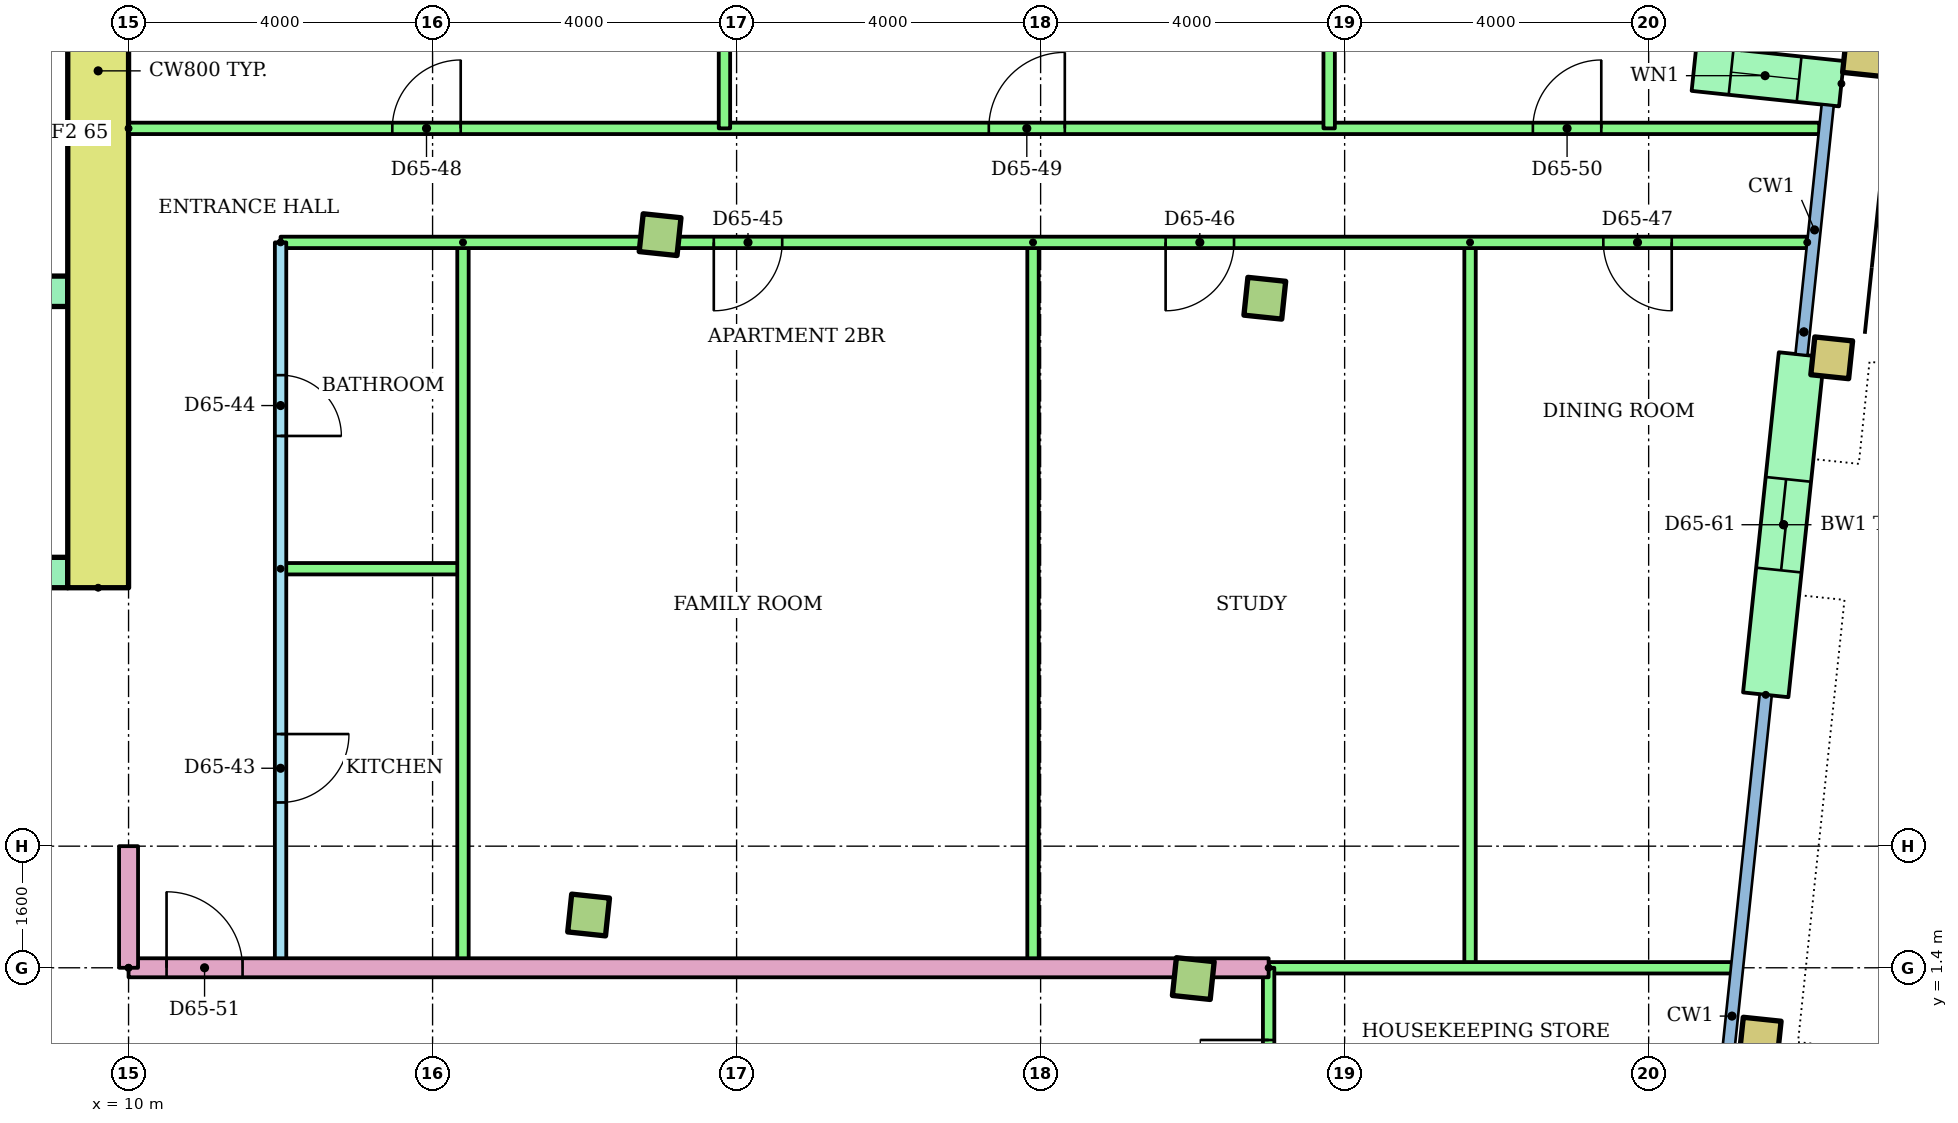
"""IFC4 building model, lengths in metres.
Left out: names, types, materials, properties, quantities, classifications, styles, units other than length and angle.
Written with IfcOpenShell. Run it as: python <this file> out.ifc"""

import sys

from ifc_helpers import new_model, si_unit, direction, frame, frame_2d, origin, origin_2d, place, context, subcontext, project, spatial, rectangle, hollow_rectangle, extrude, element, fill, save


model = new_model("IFC4")
c1 = context("Model", 3, precision=1e-05, world=origin(), true_north=direction((0.0, 1.0)))
c2 = subcontext(c1, "Body", "Model", "MODEL_VIEW")
j1 = project(units=[si_unit("LENGTHUNIT", "METRE"), si_unit("PLANEANGLEUNIT", "RADIAN")], contexts=[c1])
p1 = place(None, origin())
s1 = spatial("IfcSite", under=j1, at=p1, CompositionType="ELEMENT")
p2 = place(p1, origin())
s2 = spatial("IfcBuilding", under=s1, at=p2, CompositionType="ELEMENT")
p3 = place(p2, frame((0.0, 0.0, 253.1)))
s3 = spatial("IfcBuildingStorey", under=s2, at=p3, CompositionType="ELEMENT", Elevation=253.1)
for number, where, z_axis, x_axis in (
    (1, (16.053, 2.094, 0.0), (0.0, 0.0, 1.0), (0.995, -0.105, 0.0)),
    (2, (24.009, 1.258, 0.0), (0.0, 0.0, 1.0), (0.995, -0.105, 0.0)),
):
    element("IfcColumn", number, at=place(p3, frame(where, z_axis=z_axis, x_axis=x_axis)), inside=s3, PredefinedType="COLUMN", context=c2, shape_type="SweptSolid", body=[
        extrude(rectangle(XDim=0.5, YDim=0.5, at=origin_2d()), origin(), (0.0, 0.0, 1.0), 3.2),
    ])
p4 = place(p3, frame((31.468, 0.474, 0.0), z_axis=(0.0, 0.0, 1.0), x_axis=(0.994521895368, -0.104528463268, 0.0)))
e3 = element("IfcColumn", 3, at=p4, inside=s3, PredefinedType="COLUMN", context=c2, shape_type="SweptSolid", body=[
    extrude(hollow_rectangle(XDim=0.5, YDim=0.5, WallThickness=0.025, at=origin_2d()), origin(), (0.0, 0.0, 1.0), 3.2),
])
for number, where, z_axis, x_axis in (
    (4, (16.993, 11.045, 0.0), (0.0, 0.0, 1.0), (0.995, -0.105, 0.0)),
    (5, (24.95, 10.209, 0.0), (0.0, 0.0, 1.0), (0.995, -0.105, 0.0)),
):
    element("IfcColumn", number, at=place(p3, frame(where, z_axis=z_axis, x_axis=x_axis)), inside=s3, PredefinedType="COLUMN", context=c2, shape_type="SweptSolid", body=[
        extrude(rectangle(XDim=0.5, YDim=0.5, at=origin_2d()), origin(), (0.0, 0.0, 1.0), 3.2),
    ])
for number, where, z_axis, x_axis in (
    (6, (32.409, 9.425, 0.0), (0.0, 0.0, 1.0), (0.995, -0.105, 0.0)),
    (7, (32.827, 13.403, 0.0), (0.0, 0.0, 1.0), (0.995, -0.105, 0.0)),
):
    element("IfcColumn", number, at=place(p3, frame(where, z_axis=z_axis, x_axis=x_axis)), inside=s3, PredefinedType="COLUMN", context=c2, shape_type="SweptSolid", body=[
        extrude(hollow_rectangle(XDim=0.5, YDim=0.5, WallThickness=0.025, at=origin_2d()), origin(), (0.0, 0.0, 1.0), 3.2),
    ])
p5 = place(p3, frame((32.536, 13.031, 0.0), z_axis=(0.0, 0.0, 1.0), x_axis=(-0.994534226826, 0.104411070641, 0.0)))
e8 = element("IfcWall", 8, at=p5, inside=s3, PredefinedType="STANDARD", context=c2, shape_type="SweptSolid", body=[
    extrude(rectangle(XDim=1.95, YDim=0.6, at=frame_2d((0.975, 0.0))), origin(), (0.0, 0.0, 1.0), 2.92),
])
p6 = place(p5, frame((0.56, 0.0, 0.9)))
e9 = element("IfcOpeningElement", 9, at=p6, cuts=e8, PredefinedType="OPENING", context=c2, shape_type="SweptSolid", body=[
    extrude(rectangle(XDim=0.9, YDim=1.5, at=frame_2d((0.45, 0.75))), frame((0.0, 0.31, 0.0), z_axis=(0.0, -1.0, 0.0), x_axis=(1.0, 0.0, 0.0)), (0.0, 0.0, 1.0), 0.62),
])
p7 = place(p3, frame((31.54, 4.991, 0.0), z_axis=(0.0, 0.0, 1.0), x_axis=(0.104546400045, 0.994520009974, 0.0)))
e10 = element("IfcWall", 10, at=p7, inside=s3, PredefinedType="STANDARD", context=c2, shape_type="SweptSolid", body=[
    extrude(rectangle(XDim=4.5, YDim=0.6, at=frame_2d((2.25, 0.0))), origin(), (0.0, 0.0, 1.0), 2.92),
])
p8 = place(p7, frame((1.65, 0.0, 0.0)))
e11 = element("IfcOpeningElement", 11, at=p8, cuts=e10, PredefinedType="OPENING", context=c2, shape_type="SweptSolid", body=[
    extrude(rectangle(XDim=1.2, YDim=2.1, at=frame_2d((0.6, 1.05))), frame((0.0, 0.31, 0.0), z_axis=(0.0, -1.0, 0.0), x_axis=(1.0, 0.0, 0.0)), (0.0, 0.0, 1.0), 0.62),
])
p9 = place(p3, frame((9.6, 6.4, 0.0), z_axis=(0.0, 0.0, 1.0), x_axis=(0.0, 1.0, 0.0)))
e12 = element("IfcWall", 12, at=p9, inside=s3, PredefinedType="SHEAR", context=c2, shape_type="SweptSolid", body=[
    extrude(rectangle(XDim=13.6, YDim=0.8, at=frame_2d((6.8, 0.0))), origin(), (0.0, 0.0, 1.0), 2.92),
])
p10 = place(p3, frame((-9.2, 6.6, 0.0)))
e13 = element("IfcWall", 13, at=p10, inside=s3, PredefinedType="SHEAR", context=c2, shape_type="SweptSolid", body=[
    extrude(rectangle(XDim=18.4, YDim=0.4, at=frame_2d((9.2, 0.0))), origin(), (0.0, 0.0, 1.0), 2.92),
])
p11 = place(p10, frame((8.3, 0.0, 0.0)))
e14 = element("IfcOpeningElement", 14, at=p11, cuts=e13, PredefinedType="OPENING", context=c2, shape_type="SweptSolid", body=[
    extrude(rectangle(XDim=1.8, YDim=2.1, at=frame_2d((0.9, 1.05))), frame((0.0, 0.21, 0.0), z_axis=(0.0, -1.0, 0.0), x_axis=(1.0, 0.0, 0.0)), (0.0, 0.0, 1.0), 0.42),
])
p12 = place(p10, frame((3.8, 0.0, 0.0)))
e15 = element("IfcOpeningElement", 15, at=p12, cuts=e13, PredefinedType="OPENING", context=c2, shape_type="SweptSolid", body=[
    extrude(rectangle(XDim=1.8, YDim=2.1, at=frame_2d((0.9, 1.05))), frame((0.0, 0.21, 0.0), z_axis=(0.0, -1.0, 0.0), x_axis=(1.0, 0.0, 0.0)), (0.0, 0.0, 1.0), 0.42),
])
p13 = place(p10, frame((12.8, 0.0, 0.0)))
e16 = element("IfcOpeningElement", 16, at=p13, cuts=e13, PredefinedType="OPENING", context=c2, shape_type="SweptSolid", body=[
    extrude(rectangle(XDim=1.8, YDim=2.1, at=frame_2d((0.9, 1.05))), frame((0.0, 0.21, 0.0), z_axis=(0.0, -1.0, 0.0), x_axis=(1.0, 0.0, 0.0)), (0.0, 0.0, 1.0), 0.42),
])
p14 = place(p3, frame((1.2, 10.3, 0.0)))
e17 = element("IfcWall", 17, at=p14, inside=s3, PredefinedType="SHEAR", context=c2, shape_type="SweptSolid", body=[
    extrude(rectangle(XDim=8.0, YDim=0.4, at=frame_2d((4.0, 0.0))), origin(), (0.0, 0.0, 1.0), 2.92),
])
p15 = place(p14, frame((0.817, 0.0, 0.0)))
e18 = element("IfcOpeningElement", 18, at=p15, cuts=e17, PredefinedType="OPENING", context=c2, shape_type="SweptSolid", body=[
    extrude(rectangle(XDim=1.1, YDim=2.1, at=frame_2d((0.55, 1.05))), frame((0.0, 0.21, 0.0), z_axis=(0.0, -1.0, 0.0), x_axis=(1.0, 0.0, 0.0)), (0.0, 0.0, 1.0), 0.42),
])
p16 = place(p14, frame((3.55, 0.0, 0.0)))
e19 = element("IfcOpeningElement", 19, at=p16, cuts=e17, PredefinedType="OPENING", context=c2, shape_type="SweptSolid", body=[
    extrude(rectangle(XDim=1.1, YDim=2.1, at=frame_2d((0.55, 1.05))), frame((0.0, 0.21, 0.0), z_axis=(0.0, -1.0, 0.0), x_axis=(1.0, 0.0, 0.0)), (0.0, 0.0, 1.0), 0.42),
])
p17 = place(p14, frame((6.283, 0.0, 0.0)))
e20 = element("IfcOpeningElement", 20, at=p17, cuts=e17, PredefinedType="OPENING", context=c2, shape_type="SweptSolid", body=[
    extrude(rectangle(XDim=1.1, YDim=2.1, at=frame_2d((0.55, 1.05))), frame((0.0, 0.21, 0.0), z_axis=(0.0, -1.0, 0.0), x_axis=(1.0, 0.0, 0.0)), (0.0, 0.0, 1.0), 0.42),
])
p18 = place(p3, frame((12.0, 10.943, 0.0), z_axis=(0.0, 0.0, 1.0), x_axis=(0.0, -1.0, 0.0)))
e21 = element("IfcWall", 21, at=p18, inside=s3, PredefinedType="PARTITIONING", context=c2, shape_type="SweptSolid", body=[
    extrude(rectangle(XDim=9.543, YDim=0.15, at=frame_2d((4.772, 0.0))), origin(), (0.0, 0.0, 1.0), 2.4),
])
p19 = place(p18, frame((6.469, 0.0, 0.0)))
e22 = element("IfcOpeningElement", 22, at=p19, cuts=e21, PredefinedType="OPENING", context=c2, shape_type="SweptSolid", body=[
    extrude(rectangle(XDim=0.9, YDim=2.1, at=frame_2d((0.45, 1.05))), frame((0.0, 0.085, 0.0), z_axis=(0.0, -1.0, 0.0), x_axis=(1.0, 0.0, 0.0)), (0.0, 0.0, 1.0), 0.17),
])
p20 = place(p18, frame((1.747, 0.0, 0.0)))
e23 = element("IfcOpeningElement", 23, at=p20, cuts=e21, PredefinedType="OPENING", context=c2, shape_type="SweptSolid", body=[
    extrude(rectangle(XDim=0.8, YDim=2.1, at=frame_2d((0.4, 1.05))), frame((0.0, 0.085, 0.0), z_axis=(0.0, -1.0, 0.0), x_axis=(1.0, 0.0, 0.0)), (0.0, 0.0, 1.0), 0.17),
])
p21 = place(p3, frame((12.0, 6.65, 0.0)))
e24 = element("IfcWall", 24, at=p21, inside=s3, PredefinedType="PARTITIONING", context=c2, shape_type="SweptSolid", body=[
    extrude(rectangle(XDim=2.4, YDim=0.15, at=frame_2d((1.2, 0.0))), origin(), (0.0, 0.0, 1.0), 2.4),
])
for number, where, z_axis, x_axis in (
    (25, (14.4, 10.943, 0.0), (0.0, 0.0, 1.0), (0.0, -1.0, 0.0)),
    (26, (21.9, 10.943, 0.0), (0.0, 0.0, 1.0), (0.0, -1.0, 0.0)),
    (27, (27.65, 10.943, 0.0), (0.0, 0.0, 1.0), (0.0, -1.0, 0.0)),
):
    element("IfcWall", number, at=place(p3, frame(where, z_axis=z_axis, x_axis=x_axis)), inside=s3, PredefinedType="PARTITIONING", context=c2, shape_type="SweptSolid", body=[
        extrude(rectangle(XDim=9.543, YDim=0.15, at=frame_2d((4.772, 0.0))), origin(), (0.0, 0.0, 1.0), 2.4),
    ])
p22 = place(p3, frame((32.087, 10.943, 0.0), z_axis=(0.0, 0.0, 1.0), x_axis=(-1.0, 0.0, 0.0)))
e28 = element("IfcWall", 28, at=p22, inside=s3, PredefinedType="PARTITIONING", context=c2, shape_type="SweptSolid", body=[
    extrude(rectangle(XDim=20.087, YDim=0.15, at=frame_2d((10.043, 0.0))), origin(), (0.0, 0.0, 1.0), 2.4),
])
p23 = place(p22, frame((13.487, 0.0, 0.0)))
e29 = element("IfcOpeningElement", 29, at=p23, cuts=e28, PredefinedType="OPENING", context=c2, shape_type="SweptSolid", body=[
    extrude(rectangle(XDim=0.9, YDim=2.1, at=frame_2d((0.45, 1.05))), frame((0.0, 0.085, 0.0), z_axis=(0.0, -1.0, 0.0), x_axis=(1.0, 0.0, 0.0)), (0.0, 0.0, 1.0), 0.17),
])
p24 = place(p22, frame((7.542, 0.0, 0.0)))
e30 = element("IfcOpeningElement", 30, at=p24, cuts=e28, PredefinedType="OPENING", context=c2, shape_type="SweptSolid", body=[
    extrude(rectangle(XDim=0.9, YDim=2.1, at=frame_2d((0.45, 1.05))), frame((0.0, 0.085, 0.0), z_axis=(0.0, -1.0, 0.0), x_axis=(1.0, 0.0, 0.0)), (0.0, 0.0, 1.0), 0.17),
])
p25 = place(p22, frame((1.783, 0.0, 0.0)))
e31 = element("IfcOpeningElement", 31, at=p25, cuts=e28, PredefinedType="OPENING", context=c2, shape_type="SweptSolid", body=[
    extrude(rectangle(XDim=0.9, YDim=2.1, at=frame_2d((0.45, 1.05))), frame((0.0, 0.085, 0.0), z_axis=(0.0, -1.0, 0.0), x_axis=(1.0, 0.0, 0.0)), (0.0, 0.0, 1.0), 0.17),
])
p26 = place(p3, frame((10.0, 12.443, 0.0)))
e32 = element("IfcWall", 32, at=p26, inside=s3, PredefinedType="PARTITIONING", context=c2, shape_type="SweptSolid", body=[
    extrude(rectangle(XDim=22.244, YDim=0.15, at=frame_2d((11.122, 0.0))), origin(), (0.0, 0.0, 1.0), 2.4),
])
p27 = place(p26, frame((3.47, 0.0, 0.0)))
e33 = element("IfcOpeningElement", 33, at=p27, cuts=e32, PredefinedType="OPENING", context=c2, shape_type="SweptSolid", body=[
    extrude(rectangle(XDim=0.9, YDim=2.1, at=frame_2d((0.45, 1.05))), frame((0.0, 0.085, 0.0), z_axis=(0.0, -1.0, 0.0), x_axis=(1.0, 0.0, 0.0)), (0.0, 0.0, 1.0), 0.17),
])
p28 = place(p26, frame((11.318, 0.0, 0.0)))
e34 = element("IfcOpeningElement", 34, at=p28, cuts=e32, PredefinedType="OPENING", context=c2, shape_type="SweptSolid", body=[
    extrude(rectangle(XDim=1.0, YDim=2.1, at=frame_2d((0.5, 1.05))), frame((0.0, 0.085, 0.0), z_axis=(0.0, -1.0, 0.0), x_axis=(1.0, 0.0, 0.0)), (0.0, 0.0, 1.0), 0.17),
])
p29 = place(p26, frame((18.477, 0.0, 0.0)))
e35 = element("IfcOpeningElement", 35, at=p29, cuts=e32, PredefinedType="OPENING", context=c2, shape_type="SweptSolid", body=[
    extrude(rectangle(XDim=0.9, YDim=2.1, at=frame_2d((0.45, 1.05))), frame((0.0, 0.085, 0.0), z_axis=(0.0, -1.0, 0.0), x_axis=(1.0, 0.0, 0.0)), (0.0, 0.0, 1.0), 0.17),
])
p30 = place(p3, frame((17.84, 19.021, 0.0), z_axis=(0.0, 0.0, 1.0), x_axis=(0.0, -1.0, 0.0)))
e36 = element("IfcWall", 36, at=p30, inside=s3, PredefinedType="PARTITIONING", context=c2, shape_type="SweptSolid", body=[
    extrude(rectangle(XDim=6.578, YDim=0.15, at=frame_2d((3.289, 0.0))), origin(), (0.0, 0.0, 1.0), 2.4),
])
p31 = place(p3, frame((25.796, 18.185, 0.0), z_axis=(0.0, 0.0, 1.0), x_axis=(0.0, -1.0, 0.0)))
e37 = element("IfcWall", 37, at=p31, inside=s3, PredefinedType="PARTITIONING", context=c2, shape_type="SweptSolid", body=[
    extrude(rectangle(XDim=5.741, YDim=0.15, at=frame_2d((2.871, 0.0))), origin(), (0.0, 0.0, 1.0), 2.4),
])
p32 = place(p3, frame((10.0, 1.4, 0.0)))
e38 = element("IfcWall", 38, at=p32, inside=s3, PredefinedType="PARTITIONING", context=c2, shape_type="SweptSolid", body=[
    extrude(rectangle(XDim=15.0, YDim=0.25, at=frame_2d((7.5, 0.0))), origin(), (0.0, 0.0, 1.0), 2.4),
])
p33 = place(p32, frame((0.5, 0.0, 0.0)))
e39 = element("IfcOpeningElement", 39, at=p33, cuts=e38, PredefinedType="OPENING", context=c2, shape_type="SweptSolid", body=[
    extrude(rectangle(XDim=1.0, YDim=2.1, at=frame_2d((0.5, 1.05))), frame((0.0, 0.135, 0.0), z_axis=(0.0, -1.0, 0.0), x_axis=(1.0, 0.0, 0.0)), (0.0, 0.0, 1.0), 0.27),
])
p34 = place(p3, frame((25.0, 1.4, 0.0)))
e40 = element("IfcWall", 40, at=p34, inside=s3, PredefinedType="PARTITIONING", context=c2, shape_type="SweptSolid", body=[
    extrude(rectangle(XDim=6.093, YDim=0.15, at=frame_2d((3.046, 0.0))), origin(), (0.0, 0.0, 1.0), 2.4),
])
p35 = place(p3, frame((25.0, -1.4, 0.0), z_axis=(0.0, 0.0, 1.0), x_axis=(0.0, 1.0, 0.0)))
e41 = element("IfcWall", 41, at=p35, inside=s3, PredefinedType="PARTITIONING", context=c2, shape_type="SweptSolid", body=[
    extrude(rectangle(XDim=2.8, YDim=0.15, at=frame_2d((1.4, 0.0))), origin(), (0.0, 0.0, 1.0), 2.4),
])
p36 = place(p35, frame((0.95, 0.0, 0.0)))
e42 = element("IfcOpeningElement", 42, at=p36, cuts=e41, PredefinedType="OPENING", context=c2, shape_type="SweptSolid", body=[
    extrude(rectangle(XDim=0.9, YDim=2.1, at=frame_2d((0.45, 1.05))), frame((0.0, 0.085, 0.0), z_axis=(0.0, -1.0, 0.0), x_axis=(1.0, 0.0, 0.0)), (0.0, 0.0, 1.0), 0.17),
])
p37 = place(p3, frame((10.0, 1.4, 0.0), z_axis=(0.0, 0.0, 1.0), x_axis=(0.0, 1.0, 0.0)))
e43 = element("IfcWall", 43, at=p37, inside=s3, PredefinedType="PARTITIONING", context=c2, shape_type="SweptSolid", body=[
    extrude(rectangle(XDim=1.6, YDim=0.25, at=frame_2d((0.8, 0.0))), origin(), (0.0, 0.0, 1.0), 2.4),
])
p38 = place(p6, origin())
e44 = element("IfcWindow", 44, at=p38, inside=s3, PartitioningType="SINGLE_PANEL", PredefinedType="WINDOW", context=c2, shape_type="SweptSolid", body=[
    extrude(rectangle(XDim=0.9, YDim=1.5, at=frame_2d((0.45, 0.75))), frame((0.0, 0.03, 0.0), z_axis=(0.0, -1.0, 0.0), x_axis=(1.0, 0.0, 0.0)), (0.0, 0.0, 1.0), 0.06),
])
fill(e9, e44)
p39 = place(p19, origin())
e45 = element("IfcDoor", 45, at=p39, inside=s3, OperationType="SINGLE_SWING_LEFT", PredefinedType="DOOR", context=c2, shape_type="SweptSolid", body=[
    extrude(rectangle(XDim=0.9, YDim=2.1, at=frame_2d((0.45, 1.05))), frame((0.0, 0.025, 0.0), z_axis=(0.0, -1.0, 0.0), x_axis=(1.0, 0.0, 0.0)), (0.0, 0.0, 1.0), 0.05),
])
fill(e22, e45)
p40 = place(p20, origin())
e46 = element("IfcDoor", 46, at=p40, inside=s3, OperationType="SINGLE_SWING_RIGHT", PredefinedType="DOOR", context=c2, shape_type="SweptSolid", body=[
    extrude(rectangle(XDim=0.8, YDim=2.1, at=frame_2d((0.4, 1.05))), frame((0.0, 0.025, 0.0), z_axis=(0.0, -1.0, 0.0), x_axis=(1.0, 0.0, 0.0)), (0.0, 0.0, 1.0), 0.05),
])
fill(e23, e46)
p41 = place(p23, origin())
e47 = element("IfcDoor", 47, at=p41, inside=s3, OperationType="SINGLE_SWING_RIGHT", PredefinedType="DOOR", context=c2, shape_type="SweptSolid", body=[
    extrude(rectangle(XDim=0.9, YDim=2.1, at=frame_2d((0.45, 1.05))), frame((0.0, 0.025, 0.0), z_axis=(0.0, -1.0, 0.0), x_axis=(1.0, 0.0, 0.0)), (0.0, 0.0, 1.0), 0.05),
])
fill(e29, e47)
p42 = place(p24, origin())
e48 = element("IfcDoor", 48, at=p42, inside=s3, OperationType="SINGLE_SWING_RIGHT", PredefinedType="DOOR", context=c2, shape_type="SweptSolid", body=[
    extrude(rectangle(XDim=0.9, YDim=2.1, at=frame_2d((0.45, 1.05))), frame((0.0, 0.025, 0.0), z_axis=(0.0, -1.0, 0.0), x_axis=(1.0, 0.0, 0.0)), (0.0, 0.0, 1.0), 0.05),
])
fill(e30, e48)
p43 = place(p25, origin())
e49 = element("IfcDoor", 49, at=p43, inside=s3, OperationType="SINGLE_SWING_LEFT", PredefinedType="DOOR", context=c2, shape_type="SweptSolid", body=[
    extrude(rectangle(XDim=0.9, YDim=2.1, at=frame_2d((0.45, 1.05))), frame((0.0, 0.025, 0.0), z_axis=(0.0, -1.0, 0.0), x_axis=(1.0, 0.0, 0.0)), (0.0, 0.0, 1.0), 0.05),
])
fill(e31, e49)
p44 = place(p27, origin())
e50 = element("IfcDoor", 50, at=p44, inside=s3, OperationType="SINGLE_SWING_RIGHT", PredefinedType="DOOR", context=c2, shape_type="SweptSolid", body=[
    extrude(rectangle(XDim=0.9, YDim=2.1, at=frame_2d((0.45, 1.05))), frame((0.0, 0.025, 0.0), z_axis=(0.0, -1.0, 0.0), x_axis=(1.0, 0.0, 0.0)), (0.0, 0.0, 1.0), 0.05),
])
fill(e33, e50)
p45 = place(p28, origin())
e51 = element("IfcDoor", 51, at=p45, inside=s3, OperationType="SINGLE_SWING_RIGHT", PredefinedType="DOOR", context=c2, shape_type="SweptSolid", body=[
    extrude(rectangle(XDim=1.0, YDim=2.1, at=frame_2d((0.5, 1.05))), frame((0.0, 0.025, 0.0), z_axis=(0.0, -1.0, 0.0), x_axis=(1.0, 0.0, 0.0)), (0.0, 0.0, 1.0), 0.05),
])
fill(e34, e51)
p46 = place(p29, origin())
e52 = element("IfcDoor", 52, at=p46, inside=s3, OperationType="SINGLE_SWING_RIGHT", PredefinedType="DOOR", context=c2, shape_type="SweptSolid", body=[
    extrude(rectangle(XDim=0.9, YDim=2.1, at=frame_2d((0.45, 1.05))), frame((0.0, 0.025, 0.0), z_axis=(0.0, -1.0, 0.0), x_axis=(1.0, 0.0, 0.0)), (0.0, 0.0, 1.0), 0.05),
])
fill(e35, e52)
p47 = place(p33, origin())
e53 = element("IfcDoor", 53, at=p47, inside=s3, OperationType="SINGLE_SWING_LEFT", PredefinedType="DOOR", context=c2, shape_type="SweptSolid", body=[
    extrude(rectangle(XDim=1.0, YDim=2.1, at=frame_2d((0.5, 1.05))), frame((0.0, 0.025, 0.0), z_axis=(0.0, -1.0, 0.0), x_axis=(1.0, 0.0, 0.0)), (0.0, 0.0, 1.0), 0.05),
])
fill(e39, e53)
p48 = place(p36, origin())
e54 = element("IfcDoor", 54, at=p48, inside=s3, OperationType="SINGLE_SWING_RIGHT", PredefinedType="DOOR", context=c2, shape_type="SweptSolid", body=[
    extrude(rectangle(XDim=0.9, YDim=2.1, at=frame_2d((0.45, 1.05))), frame((0.0, 0.025, 0.0), z_axis=(0.0, -1.0, 0.0), x_axis=(1.0, 0.0, 0.0)), (0.0, 0.0, 1.0), 0.05),
])
fill(e42, e54)
p49 = place(p8, origin())
e55 = element("IfcDoor", 55, at=p49, inside=s3, OperationType="SLIDING_TO_LEFT", PredefinedType="DOOR", context=c2, shape_type="SweptSolid", body=[
    extrude(rectangle(XDim=1.2, YDim=2.1, at=frame_2d((0.6, 1.05))), frame((0.0, 0.025, 0.0), z_axis=(0.0, -1.0, 0.0), x_axis=(1.0, 0.0, 0.0)), (0.0, 0.0, 1.0), 0.05),
])
fill(e11, e55)
save(model, sys.argv[1])
